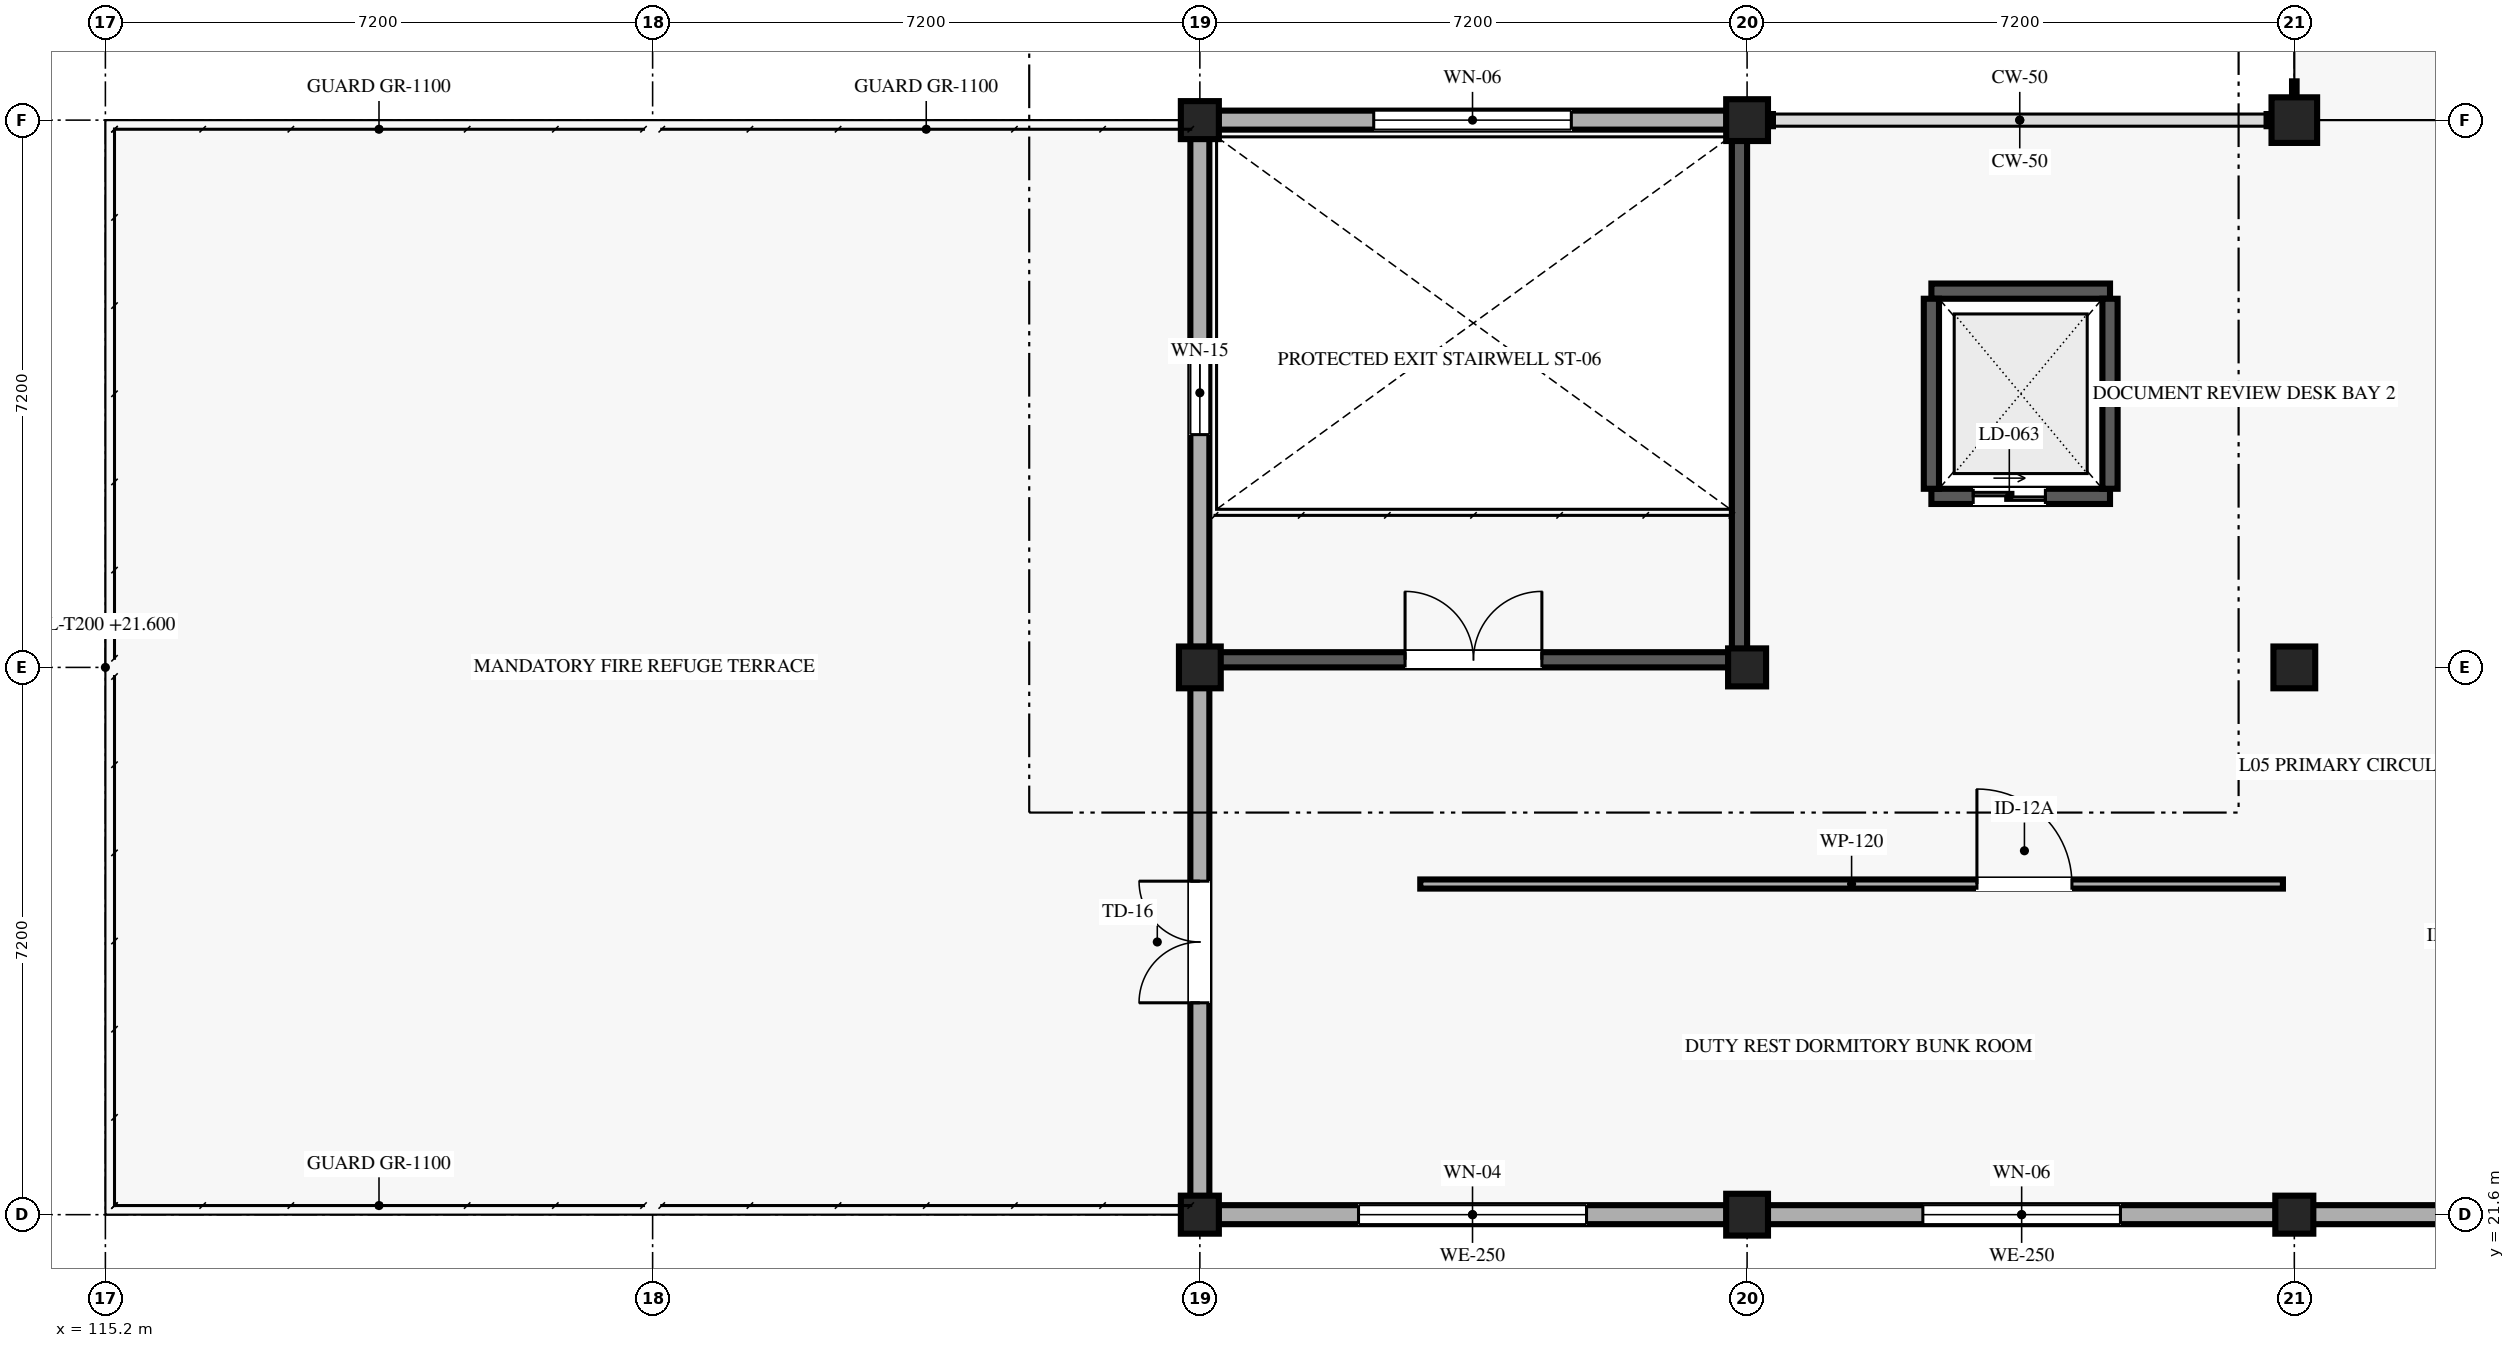
"""IFC4 building model, lengths in metres.
Left out: names, types, materials, properties, quantities, classifications, styles, units other than length and angle.
Written with IfcOpenShell. Run it as: python <this file> out.ifc"""

import sys

from ifc_helpers import new_model, si_unit, direction, frame, frame_2d, origin, origin_2d, place, context, subcontext, project, spatial, rectangle, extrude, element, fill, save


model = new_model("IFC4")
c1 = context("Model", 3, precision=1e-05, world=origin(), true_north=direction((0.0, 1.0)))
c2 = subcontext(c1, "Body", "Model", "MODEL_VIEW")
j1 = project(units=[si_unit("LENGTHUNIT", "METRE"), si_unit("PLANEANGLEUNIT", "RADIAN")], contexts=[c1])
p1 = place(None, origin())
s1 = spatial("IfcSite", under=j1, at=p1, CompositionType="ELEMENT")
p2 = place(p1, origin())
s2 = spatial("IfcBuilding", under=s1, at=p2, CompositionType="ELEMENT")
p3 = place(p2, frame((0.0, 0.0, 21.6)))
s3 = spatial("IfcBuildingStorey", under=s2, at=p3, CompositionType="ELEMENT", Elevation=21.6)
p4 = place(p3, frame((129.6, 21.6, 0.0), z_axis=(0.0, 0.0, 1.0), x_axis=(1.0, 0.0, 0.0)))
e1 = element("IfcColumn", 1, at=p4, inside=s3, PredefinedType="COLUMN", context=c2, shape_type="SweptSolid", body=[
    extrude(rectangle(XDim=0.5, YDim=0.5, at=origin_2d()), origin(), (0.0, 0.0, 1.0), 4.05),
])
p5 = place(p3, frame((129.6, 28.8, 0.0), z_axis=(0.0, 0.0, 1.0), x_axis=(1.0, 0.0, 0.0)))
e2 = element("IfcColumn", 2, at=p5, inside=s3, PredefinedType="COLUMN", context=c2, shape_type="SweptSolid", body=[
    extrude(rectangle(XDim=0.55, YDim=0.55, at=origin_2d()), origin(), (0.0, 0.0, 1.0), 4.05),
])
p6 = place(p3, frame((129.6, 36.0, 0.0), z_axis=(0.0, 0.0, 1.0), x_axis=(1.0, 0.0, 0.0)))
e3 = element("IfcColumn", 3, at=p6, inside=s3, PredefinedType="COLUMN", context=c2, shape_type="SweptSolid", body=[
    extrude(rectangle(XDim=0.5, YDim=0.5, at=origin_2d()), origin(), (0.0, 0.0, 1.0), 4.05),
])
p7 = place(p3, frame((136.8, 21.6, 0.0), z_axis=(0.0, 0.0, 1.0), x_axis=(1.0, 0.0, 0.0)))
e4 = element("IfcColumn", 4, at=p7, inside=s3, PredefinedType="COLUMN", context=c2, shape_type="SweptSolid", body=[
    extrude(rectangle(XDim=0.55, YDim=0.55, at=origin_2d()), origin(), (0.0, 0.0, 1.0), 4.05),
])
p8 = place(p3, frame((136.8, 28.8, 0.0), z_axis=(0.0, 0.0, 1.0), x_axis=(1.0, 0.0, 0.0)))
e5 = element("IfcColumn", 5, at=p8, inside=s3, PredefinedType="COLUMN", context=c2, shape_type="SweptSolid", body=[
    extrude(rectangle(XDim=0.5, YDim=0.5, at=origin_2d()), origin(), (0.0, 0.0, 1.0), 4.05),
])
p9 = place(p3, frame((136.8, 36.0, 0.0), z_axis=(0.0, 0.0, 1.0), x_axis=(1.0, 0.0, 0.0)))
e6 = element("IfcColumn", 6, at=p9, inside=s3, PredefinedType="COLUMN", context=c2, shape_type="SweptSolid", body=[
    extrude(rectangle(XDim=0.55, YDim=0.55, at=origin_2d()), origin(), (0.0, 0.0, 1.0), 4.05),
])
p10 = place(p3, frame((144.0, 21.6, 0.0), z_axis=(0.0, 0.0, 1.0), x_axis=(1.0, 0.0, 0.0)))
e7 = element("IfcColumn", 7, at=p10, inside=s3, PredefinedType="COLUMN", context=c2, shape_type="SweptSolid", body=[
    extrude(rectangle(XDim=0.5, YDim=0.5, at=origin_2d()), origin(), (0.0, 0.0, 1.0), 4.05),
])
p11 = place(p3, frame((144.0, 28.8, 0.0), z_axis=(0.0, 0.0, 1.0), x_axis=(1.0, 0.0, 0.0)))
e8 = element("IfcColumn", 8, at=p11, inside=s3, PredefinedType="COLUMN", context=c2, shape_type="SweptSolid", body=[
    extrude(rectangle(XDim=0.55, YDim=0.55, at=origin_2d()), origin(), (0.0, 0.0, 1.0), 4.05),
])
p12 = place(p3, frame((144.0, 36.0, 0.0), z_axis=(0.0, 0.0, 1.0), x_axis=(1.0, 0.0, 0.0)))
e9 = element("IfcColumn", 9, at=p12, inside=s3, PredefinedType="COLUMN", context=c2, shape_type="SweptSolid", body=[
    extrude(rectangle(XDim=0.6, YDim=0.6, at=origin_2d()), origin(), (0.0, 0.0, 1.0), 4.05),
])
p13 = place(p3, frame((129.845, 21.6, 0.0), z_axis=(0.0, 0.0, 1.0), x_axis=(1.0, 0.0, 0.0)))
e10 = element("IfcWall", 10, at=p13, inside=s3, PredefinedType="SOLIDWALL", context=c2, shape_type="SweptSolid", body=[
    extrude(rectangle(XDim=6.685, YDim=0.25, at=frame_2d((3.343, 0.0))), origin(), (0.0, 0.0, 1.0), 3.295),
])
p14 = place(p13, frame((1.843, 0.0, 0.85)))
e11 = element("IfcOpeningElement", 11, at=p14, cuts=e10, PredefinedType="OPENING", context=c2, shape_type="SweptSolid", body=[
    extrude(rectangle(XDim=3.0, YDim=1.9, at=frame_2d((1.5, 0.95))), frame((0.0, 0.135, 0.0), z_axis=(0.0, -1.0, 0.0), x_axis=(1.0, 0.0, 0.0)), (0.0, 0.0, 1.0), 0.27),
])
p15 = place(p3, frame((137.07, 21.6, 0.0), z_axis=(0.0, 0.0, 1.0), x_axis=(1.0, 0.0, 0.0)))
e12 = element("IfcWall", 12, at=p15, inside=s3, PredefinedType="SOLIDWALL", context=c2, shape_type="SweptSolid", body=[
    extrude(rectangle(XDim=6.685, YDim=0.25, at=frame_2d((3.342, 0.0))), origin(), (0.0, 0.0, 1.0), 3.295),
])
p16 = place(p15, frame((2.042, 0.0, 0.85)))
e13 = element("IfcOpeningElement", 13, at=p16, cuts=e12, PredefinedType="OPENING", context=c2, shape_type="SweptSolid", body=[
    extrude(rectangle(XDim=2.6, YDim=1.8, at=frame_2d((1.3, 0.9))), frame((0.0, 0.135, 0.0), z_axis=(0.0, -1.0, 0.0), x_axis=(1.0, 0.0, 0.0)), (0.0, 0.0, 1.0), 0.27),
])
p17 = place(p3, frame((144.245, 21.6, 0.0), z_axis=(0.0, 0.0, 1.0), x_axis=(1.0, 0.0, 0.0)))
e14 = element("IfcWall", 14, at=p17, inside=s3, PredefinedType="SOLIDWALL", context=c2, shape_type="SweptSolid", body=[
    extrude(rectangle(XDim=6.685, YDim=0.25, at=frame_2d((3.342, 0.0))), origin(), (0.0, 0.0, 1.0), 3.295),
])
p18 = place(p17, frame((2.242, 0.0, 0.85)))
e15 = element("IfcOpeningElement", 15, at=p18, cuts=e14, PredefinedType="OPENING", context=c2, shape_type="SweptSolid", body=[
    extrude(rectangle(XDim=2.2, YDim=1.7, at=frame_2d((1.1, 0.85))), frame((0.0, 0.135, 0.0), z_axis=(0.0, -1.0, 0.0), x_axis=(1.0, 0.0, 0.0)), (0.0, 0.0, 1.0), 0.27),
])
p19 = place(p3, frame((129.845, 36.0, 0.0), z_axis=(0.0, 0.0, 1.0), x_axis=(1.0, 0.0, 0.0)))
e16 = element("IfcWall", 16, at=p19, inside=s3, PredefinedType="SOLIDWALL", context=c2, shape_type="SweptSolid", body=[
    extrude(rectangle(XDim=6.685, YDim=0.25, at=frame_2d((3.343, 0.0))), origin(), (0.0, 0.0, 1.0), 3.295),
])
p20 = place(p19, frame((2.042, 0.0, 0.85)))
e17 = element("IfcOpeningElement", 17, at=p20, cuts=e16, PredefinedType="OPENING", context=c2, shape_type="SweptSolid", body=[
    extrude(rectangle(XDim=2.6, YDim=1.8, at=frame_2d((1.3, 0.9))), frame((0.0, 0.135, 0.0), z_axis=(0.0, -1.0, 0.0), x_axis=(1.0, 0.0, 0.0)), (0.0, 0.0, 1.0), 0.27),
])
p21 = place(p3, frame((129.6, 21.845, 0.0), z_axis=(0.0, 0.0, 1.0), x_axis=(0.0, 1.0, 0.0)))
e18 = element("IfcWall", 18, at=p21, inside=s3, PredefinedType="SOLIDWALL", context=c2, shape_type="SweptSolid", body=[
    extrude(rectangle(XDim=6.685, YDim=0.25, at=frame_2d((3.343, 0.0))), origin(), (0.0, 0.0, 1.0), 3.295),
])
p22 = place(p21, frame((2.542, 0.0, 0.0)))
e19 = element("IfcOpeningElement", 19, at=p22, cuts=e18, PredefinedType="OPENING", context=c2, shape_type="SweptSolid", body=[
    extrude(rectangle(XDim=1.6, YDim=2.2, at=frame_2d((0.8, 1.1))), frame((0.0, 0.135, 0.0), z_axis=(0.0, -1.0, 0.0), x_axis=(1.0, 0.0, 0.0)), (0.0, 0.0, 1.0), 0.27),
])
p23 = place(p3, frame((129.6, 29.07, 0.0), z_axis=(0.0, 0.0, 1.0), x_axis=(0.0, 1.0, 0.0)))
e20 = element("IfcWall", 20, at=p23, inside=s3, PredefinedType="SOLIDWALL", context=c2, shape_type="SweptSolid", body=[
    extrude(rectangle(XDim=6.685, YDim=0.25, at=frame_2d((3.342, 0.0))), origin(), (0.0, 0.0, 1.0), 3.295),
])
p24 = place(p23, frame((2.792, 0.0, 0.85)))
e21 = element("IfcOpeningElement", 21, at=p24, cuts=e20, PredefinedType="OPENING", context=c2, shape_type="SweptSolid", body=[
    extrude(rectangle(XDim=1.1, YDim=1.75, at=frame_2d((0.55, 0.875))), frame((0.0, 0.135, 0.0), z_axis=(0.0, -1.0, 0.0), x_axis=(1.0, 0.0, 0.0)), (0.0, 0.0, 1.0), 0.27),
])
p25 = place(p3, frame((129.8, 28.9, 0.0), z_axis=(0.0, 0.0, 1.0), x_axis=(1.0, 0.0, 0.0)))
e22 = element("IfcWall", 22, at=p25, inside=s3, PredefinedType="SHEAR", context=c2, shape_type="SweptSolid", body=[
    extrude(rectangle(XDim=6.8, YDim=0.2, at=frame_2d((3.4, 0.0))), origin(), (0.0, 0.0, 1.0), 3.83),
])
p26 = place(p25, frame((2.5, 0.0, 0.0)))
e23 = element("IfcOpeningElement", 23, at=p26, cuts=e22, PredefinedType="OPENING", context=c2, shape_type="SweptSolid", body=[
    extrude(rectangle(XDim=1.8, YDim=2.2, at=frame_2d((0.9, 1.1))), frame((0.0, 0.11, 0.0), z_axis=(0.0, -1.0, 0.0), x_axis=(1.0, 0.0, 0.0)), (0.0, 0.0, 1.0), 0.22),
])
p27 = place(p3, frame((136.7, 29.0, 0.0), z_axis=(0.0, 0.0, 1.0), x_axis=(0.0, 1.0, 0.0)))
e24 = element("IfcWall", 24, at=p27, inside=s3, PredefinedType="SHEAR", context=c2, shape_type="SweptSolid", body=[
    extrude(rectangle(XDim=6.8, YDim=0.2, at=frame_2d((3.4, 0.0))), origin(), (0.0, 0.0, 1.0), 3.83),
])
p28 = place(p3, frame((139.225, 31.05, 0.0), z_axis=(0.0, 0.0, 1.0), x_axis=(1.0, 0.0, 0.0)))
e25 = element("IfcWall", 25, at=p28, inside=s3, PredefinedType="SHEAR", context=c2, shape_type="SweptSolid", body=[
    extrude(rectangle(XDim=2.35, YDim=0.2, at=frame_2d((1.175, 0.0))), origin(), (0.0, 0.0, 1.0), 3.83),
])
p29 = place(p28, frame((0.55, 0.0, 0.0)))
e26 = element("IfcOpeningElement", 26, at=p29, cuts=e25, PredefinedType="OPENING", context=c2, shape_type="SweptSolid", body=[
    extrude(rectangle(XDim=0.95, YDim=2.1, at=frame_2d((0.475, 1.05))), frame((0.0, 0.11, 0.0), z_axis=(0.0, -1.0, 0.0), x_axis=(1.0, 0.0, 0.0)), (0.0, 0.0, 1.0), 0.22),
])
p30 = place(p3, frame((139.225, 33.75, 0.0), z_axis=(0.0, 0.0, 1.0), x_axis=(1.0, 0.0, 0.0)))
e27 = element("IfcWall", 27, at=p30, inside=s3, PredefinedType="SHEAR", context=c2, shape_type="SweptSolid", body=[
    extrude(rectangle(XDim=2.35, YDim=0.2, at=frame_2d((1.175, 0.0))), origin(), (0.0, 0.0, 1.0), 3.83),
])
for number, where, z_axis, x_axis in (
    (28, (139.225, 31.15, 0.0), (0.0, 0.0, 1.0), (0.0, 1.0, 0.0)),
    (29, (141.575, 31.15, 0.0), (0.0, 0.0, 1.0), (0.0, 1.0, 0.0)),
):
    element("IfcWall", number, at=place(p3, frame(where, z_axis=z_axis, x_axis=x_axis)), inside=s3, PredefinedType="SHEAR", context=c2, shape_type="SweptSolid", body=[
        extrude(rectangle(XDim=2.5, YDim=0.2, at=frame_2d((1.25, 0.0))), origin(), (0.0, 0.0, 1.0), 3.83),
    ])
p31 = place(p3, frame((132.5, 25.95, 0.0), z_axis=(0.0, 0.0, 1.0), x_axis=(1.0, 0.0, 0.0)))
e30 = element("IfcWall", 30, at=p31, inside=s3, PredefinedType="PARTITIONING", context=c2, shape_type="SweptSolid", body=[
    extrude(rectangle(XDim=11.35, YDim=0.12, at=frame_2d((5.675, 0.0))), origin(), (0.0, 0.0, 1.0), 3.83),
])
p32 = place(p31, frame((7.324, 0.0, 0.0)))
e31 = element("IfcOpeningElement", 31, at=p32, cuts=e30, PredefinedType="OPENING", context=c2, shape_type="SweptSolid", body=[
    extrude(rectangle(XDim=1.25, YDim=2.2, at=frame_2d((0.625, 1.1))), frame((0.0, 0.07, 0.0), z_axis=(0.0, -1.0, 0.0), x_axis=(1.0, 0.0, 0.0)), (0.0, 0.0, 1.0), 0.14),
])
p33 = place(p14, origin())
e32 = element("IfcWindow", 32, at=p33, inside=s3, PartitioningType="SINGLE_PANEL", PredefinedType="WINDOW", context=c2, shape_type="SweptSolid", body=[
    extrude(rectangle(XDim=3.0, YDim=1.9, at=frame_2d((1.5, 0.95))), frame((0.0, 0.03, 0.0), z_axis=(0.0, -1.0, 0.0), x_axis=(1.0, 0.0, 0.0)), (0.0, 0.0, 1.0), 0.06),
])
fill(e11, e32)
p34 = place(p16, origin())
e33 = element("IfcWindow", 33, at=p34, inside=s3, PartitioningType="SINGLE_PANEL", PredefinedType="WINDOW", context=c2, shape_type="SweptSolid", body=[
    extrude(rectangle(XDim=2.6, YDim=1.8, at=frame_2d((1.3, 0.9))), frame((0.0, 0.03, 0.0), z_axis=(0.0, -1.0, 0.0), x_axis=(1.0, 0.0, 0.0)), (0.0, 0.0, 1.0), 0.06),
])
fill(e13, e33)
p35 = place(p20, origin())
e34 = element("IfcWindow", 34, at=p35, inside=s3, PartitioningType="SINGLE_PANEL", PredefinedType="WINDOW", context=c2, shape_type="SweptSolid", body=[
    extrude(rectangle(XDim=2.6, YDim=1.8, at=frame_2d((1.3, 0.9))), frame((0.0, 0.03, 0.0), z_axis=(0.0, -1.0, 0.0), x_axis=(1.0, 0.0, 0.0)), (0.0, 0.0, 1.0), 0.06),
])
fill(e17, e34)
p36 = place(p22, origin())
e35 = element("IfcDoor", 35, at=p36, inside=s3, OperationType="DOUBLE_DOOR_SINGLE_SWING", PredefinedType="DOOR", context=c2, shape_type="SweptSolid", body=[
    extrude(rectangle(XDim=1.6, YDim=2.2, at=frame_2d((0.8, 1.1))), frame((0.0, 0.025, 0.0), z_axis=(0.0, -1.0, 0.0), x_axis=(1.0, 0.0, 0.0)), (0.0, 0.0, 1.0), 0.05),
])
fill(e19, e35)
p37 = place(p24, origin())
e36 = element("IfcWindow", 36, at=p37, inside=s3, PartitioningType="SINGLE_PANEL", PredefinedType="WINDOW", context=c2, shape_type="SweptSolid", body=[
    extrude(rectangle(XDim=1.1, YDim=1.75, at=frame_2d((0.55, 0.875))), frame((0.0, 0.03, 0.0), z_axis=(0.0, -1.0, 0.0), x_axis=(1.0, 0.0, 0.0)), (0.0, 0.0, 1.0), 0.06),
])
fill(e21, e36)
p38 = place(p26, origin())
e37 = element("IfcDoor", 37, at=p38, inside=s3, OperationType="DOUBLE_DOOR_SINGLE_SWING", PredefinedType="DOOR", context=c2, shape_type="SweptSolid", body=[
    extrude(rectangle(XDim=1.8, YDim=2.2, at=frame_2d((0.9, 1.1))), frame((0.0, 0.025, 0.0), z_axis=(0.0, -1.0, 0.0), x_axis=(1.0, 0.0, 0.0)), (0.0, 0.0, 1.0), 0.05),
])
fill(e23, e37)
p39 = place(p29, origin())
e38 = element("IfcDoor", 38, at=p39, inside=s3, OperationType="DOUBLE_DOOR_SLIDING", PredefinedType="DOOR", context=c2, shape_type="SweptSolid", body=[
    extrude(rectangle(XDim=0.95, YDim=2.1, at=frame_2d((0.475, 1.05))), frame((0.0, 0.025, 0.0), z_axis=(0.0, -1.0, 0.0), x_axis=(1.0, 0.0, 0.0)), (0.0, 0.0, 1.0), 0.05),
])
fill(e26, e38)
p40 = place(p32, origin())
e39 = element("IfcDoor", 39, at=p40, inside=s3, OperationType="SINGLE_SWING_LEFT", PredefinedType="DOOR", context=c2, shape_type="SweptSolid", body=[
    extrude(rectangle(XDim=1.25, YDim=2.2, at=frame_2d((0.625, 1.1))), frame((0.0, 0.025, 0.0), z_axis=(0.0, -1.0, 0.0), x_axis=(1.0, 0.0, 0.0)), (0.0, 0.0, 1.0), 0.05),
])
fill(e31, e39)
save(model, sys.argv[1])
